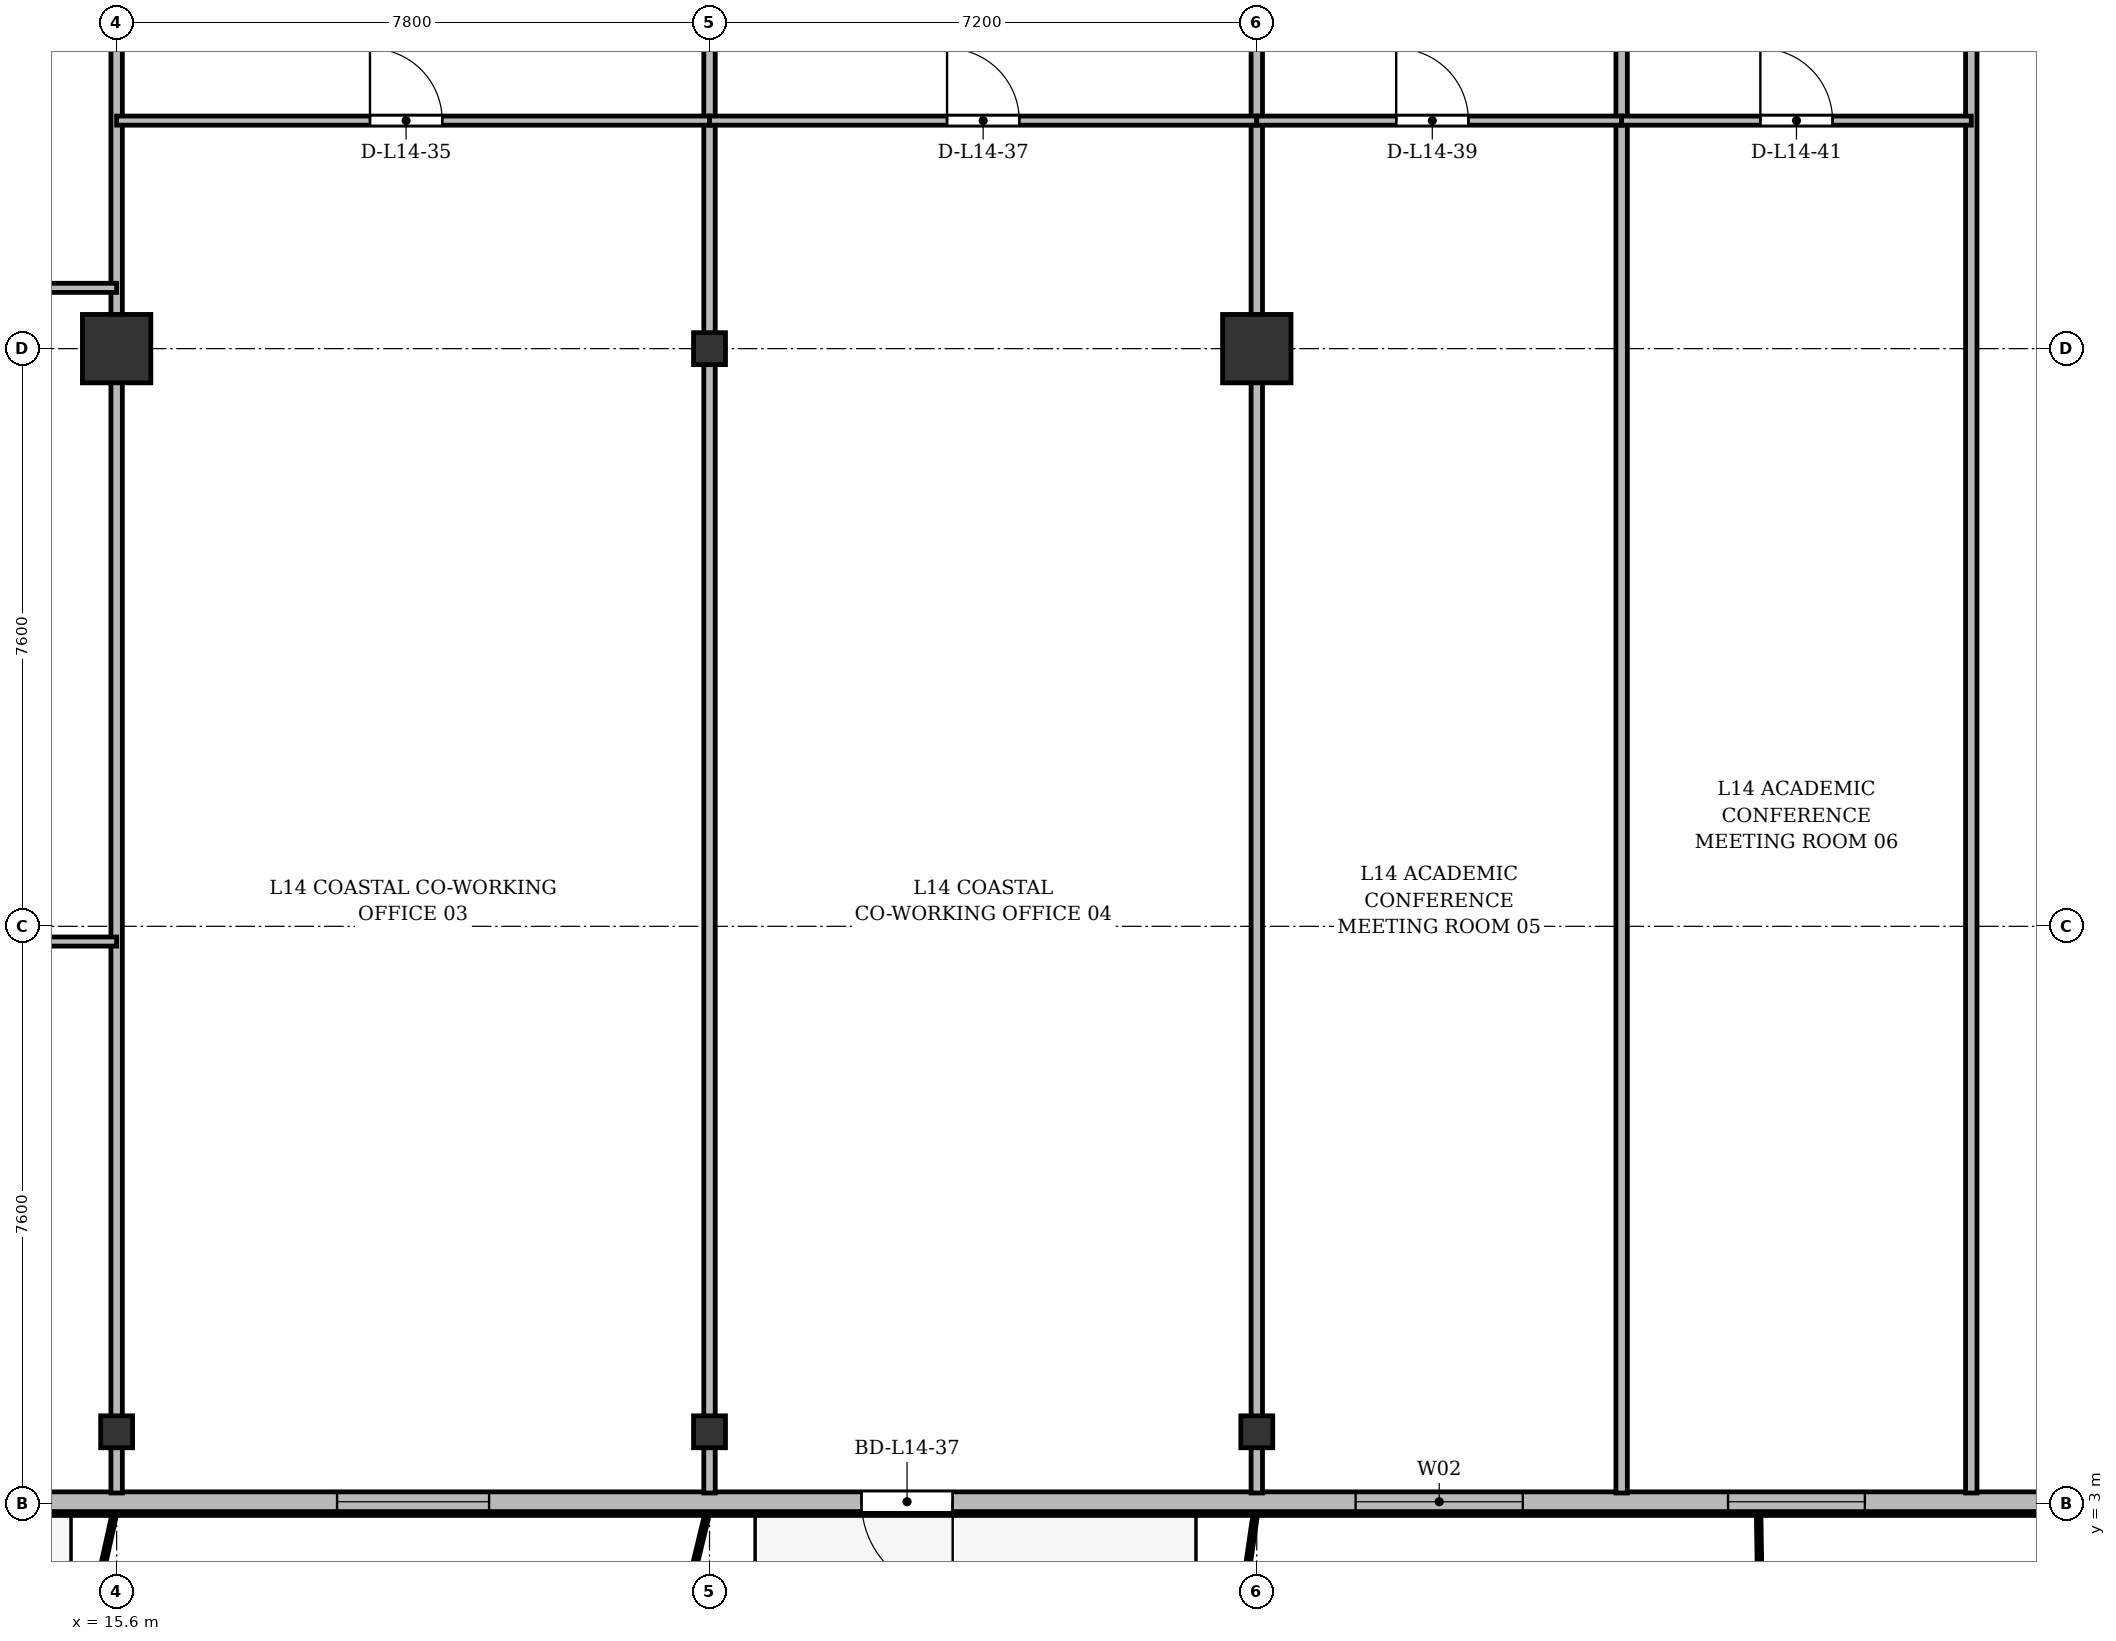
"""IFC4 building model, lengths in metres.
Left out: names, types, materials, properties, quantities, classifications, styles, units other than length and angle.
Written with IfcOpenShell. Run it as: python <this file> out.ifc"""

import sys

from ifc_helpers import new_model, si_unit, direction, frame, frame_2d, origin, origin_2d, place, context, subcontext, project, spatial, rectangle, i_section, extrude, source, transform, mapped, element, fill, save


model = new_model("IFC4")
c1 = context("Model", 3, precision=1e-05, world=origin(), true_north=direction((0.0, 1.0)))
c2 = subcontext(c1, "Body", "Model", "MODEL_VIEW")
j1 = project(units=[si_unit("LENGTHUNIT", "METRE"), si_unit("PLANEANGLEUNIT", "RADIAN")], contexts=[c1])
p1 = place(None, origin())
s1 = spatial("IfcSite", under=j1, at=p1, CompositionType="ELEMENT")
p2 = place(p1, origin())
s2 = spatial("IfcBuilding", under=s1, at=p2, CompositionType="ELEMENT")
p3 = place(p2, frame((0.0, 0.0, 55.9)))
s3 = spatial("IfcBuildingStorey", under=s2, at=p3, CompositionType="ELEMENT", Elevation=55.9)
m1 = source(origin(), c2, "Body", "SweptSolid", [
    extrude(i_section(OverallWidth=0.42, OverallDepth=0.42, WebThickness=0.026, FlangeThickness=0.04, at=origin_2d()), origin(), (0.0, 0.0, 1.0), 3.6),
])
p4 = place(p3, frame((15.6, 3.95, 0.0), z_axis=(0.0, 0.0, 1.0), x_axis=(1.0, 0.0, 0.0)))
e1 = element("IfcColumn", 1, at=p4, inside=s3, PredefinedType="COLUMN", context=c2, shape_type="MappedRepresentation", body=[
    mapped(m1, transform((0.0, 0.0, 0.0), x_axis=(1.0, 0.0, 0.0), y_axis=(0.0, 1.0, 0.0), z_axis=(0.0, 0.0, 1.0), scale=1.0)),
])
m2 = source(origin(), c2, "Body", "SweptSolid", [
    extrude(rectangle(XDim=0.9, YDim=0.9, at=origin_2d()), origin(), (0.0, 0.0, 1.0), 3.6),
])
p5 = place(p3, frame((15.6, 18.2, 0.0), z_axis=(0.0, 0.0, 1.0), x_axis=(1.0, 0.0, 0.0)))
e2 = element("IfcColumn", 2, at=p5, inside=s3, PredefinedType="COLUMN", context=c2, shape_type="MappedRepresentation", body=[
    mapped(m2, transform((0.0, 0.0, 0.0), x_axis=(1.0, 0.0, 0.0), y_axis=(0.0, 1.0, 0.0), z_axis=(0.0, 0.0, 1.0), scale=1.0)),
])
for number, where, z_axis, x_axis in (
    (3, (23.4, 3.95, 0.0), (0.0, 0.0, 1.0), (1.0, 0.0, 0.0)),
    (4, (23.4, 18.2, 0.0), (0.0, 0.0, 1.0), (1.0, 0.0, 0.0)),
    (5, (30.6, 3.95, 0.0), (0.0, 0.0, 1.0), (1.0, 0.0, 0.0)),
):
    element("IfcColumn", number, at=place(p3, frame(where, z_axis=z_axis, x_axis=x_axis)), inside=s3, PredefinedType="COLUMN", context=c2, shape_type="MappedRepresentation", body=[
        mapped(m1, transform((0.0, 0.0, 0.0), x_axis=(1.0, 0.0, 0.0), y_axis=(0.0, 1.0, 0.0), z_axis=(0.0, 0.0, 1.0), scale=1.0)),
    ])
p6 = place(p3, frame((30.6, 18.2, 0.0), z_axis=(0.0, 0.0, 1.0), x_axis=(1.0, 0.0, 0.0)))
e6 = element("IfcColumn", 6, at=p6, inside=s3, PredefinedType="COLUMN", context=c2, shape_type="MappedRepresentation", body=[
    mapped(m2, transform((0.0, 0.0, 0.0), x_axis=(1.0, 0.0, 0.0), y_axis=(0.0, 1.0, 0.0), z_axis=(0.0, 0.0, 1.0), scale=1.0)),
])
p7 = place(p3, frame((66.9, 3.03, 0.0), z_axis=(0.0, 0.0, 1.0), x_axis=(-1.0, 0.0, 0.0)))
e7 = element("IfcWall", 7, at=p7, inside=s3, PredefinedType="SOLIDWALL", context=c2, shape_type="SweptSolid", body=[
    extrude(rectangle(XDim=59.4, YDim=0.26, at=frame_2d((29.7, 0.0))), origin(), (0.0, 0.0, 1.0), 3.34),
])
p8 = place(p7, frame((3.8, 0.0, 0.9)))
e8 = element("IfcOpeningElement", 8, at=p8, cuts=e7, PredefinedType="OPENING", context=c2, shape_type="SweptSolid", body=[
    extrude(rectangle(XDim=1.8, YDim=1.8, at=frame_2d((0.9, 0.9))), frame((0.0, 0.14, 0.0), z_axis=(0.0, -1.0, 0.0), x_axis=(1.0, 0.0, 0.0)), (0.0, 0.0, 1.0), 0.28),
])
p9 = place(p7, frame((9.18, 0.0, 0.0)))
e9 = element("IfcOpeningElement", 9, at=p9, cuts=e7, PredefinedType="OPENING", context=c2, shape_type="SweptSolid", body=[
    extrude(rectangle(XDim=1.2, YDim=2.2, at=frame_2d((0.6, 1.1))), frame((0.0, 0.14, 0.0), z_axis=(0.0, -1.0, 0.0), x_axis=(1.0, 0.0, 0.0)), (0.0, 0.0, 1.0), 0.28),
])
p10 = place(p7, frame((13.2, 0.0, 0.9)))
e10 = element("IfcOpeningElement", 10, at=p10, cuts=e7, PredefinedType="OPENING", context=c2, shape_type="SweptSolid", body=[
    extrude(rectangle(XDim=1.5, YDim=1.75, at=frame_2d((0.75, 0.875))), frame((0.0, 0.14, 0.0), z_axis=(0.0, -1.0, 0.0), x_axis=(1.0, 0.0, 0.0)), (0.0, 0.0, 1.0), 0.28),
])
p11 = place(p7, frame((18.5, 0.0, 0.9)))
e11 = element("IfcOpeningElement", 11, at=p11, cuts=e7, PredefinedType="OPENING", context=c2, shape_type="SweptSolid", body=[
    extrude(rectangle(XDim=2.0, YDim=1.95, at=frame_2d((1.0, 0.975))), frame((0.0, 0.14, 0.0), z_axis=(0.0, -1.0, 0.0), x_axis=(1.0, 0.0, 0.0)), (0.0, 0.0, 1.0), 0.28),
])
p12 = place(p7, frame((24.175, 0.0, 0.9)))
e12 = element("IfcOpeningElement", 12, at=p12, cuts=e7, PredefinedType="OPENING", context=c2, shape_type="SweptSolid", body=[
    extrude(rectangle(XDim=1.65, YDim=1.85, at=frame_2d((0.825, 0.925))), frame((0.0, 0.14, 0.0), z_axis=(0.0, -1.0, 0.0), x_axis=(1.0, 0.0, 0.0)), (0.0, 0.0, 1.0), 0.28),
])
p13 = place(p7, frame((28.3, 0.0, 0.9)))
e13 = element("IfcOpeningElement", 13, at=p13, cuts=e7, PredefinedType="OPENING", context=c2, shape_type="SweptSolid", body=[
    extrude(rectangle(XDim=1.8, YDim=1.8, at=frame_2d((0.9, 0.9))), frame((0.0, 0.14, 0.0), z_axis=(0.0, -1.0, 0.0), x_axis=(1.0, 0.0, 0.0)), (0.0, 0.0, 1.0), 0.28),
])
p14 = place(p7, frame((32.8, 0.0, 0.9)))
e14 = element("IfcOpeningElement", 14, at=p14, cuts=e7, PredefinedType="OPENING", context=c2, shape_type="SweptSolid", body=[
    extrude(rectangle(XDim=2.2, YDim=1.8, at=frame_2d((1.1, 0.9))), frame((0.0, 0.14, 0.0), z_axis=(0.0, -1.0, 0.0), x_axis=(1.0, 0.0, 0.0)), (0.0, 0.0, 1.0), 0.28),
])
p15 = place(p7, frame((40.301, 0.0, 0.0)))
e15 = element("IfcOpeningElement", 15, at=p15, cuts=e7, PredefinedType="OPENING", context=c2, shape_type="SweptSolid", body=[
    extrude(rectangle(XDim=1.2, YDim=2.2, at=frame_2d((0.6, 1.1))), frame((0.0, 0.14, 0.0), z_axis=(0.0, -1.0, 0.0), x_axis=(1.0, 0.0, 0.0)), (0.0, 0.0, 1.0), 0.28),
])
p16 = place(p7, frame((46.4, 0.0, 0.9)))
e16 = element("IfcOpeningElement", 16, at=p16, cuts=e7, PredefinedType="OPENING", context=c2, shape_type="SweptSolid", body=[
    extrude(rectangle(XDim=2.0, YDim=1.95, at=frame_2d((1.0, 0.975))), frame((0.0, 0.14, 0.0), z_axis=(0.0, -1.0, 0.0), x_axis=(1.0, 0.0, 0.0)), (0.0, 0.0, 1.0), 0.28),
])
p17 = place(p7, frame((53.136, 0.0, 0.0)))
e17 = element("IfcOpeningElement", 17, at=p17, cuts=e7, PredefinedType="OPENING", context=c2, shape_type="SweptSolid", body=[
    extrude(rectangle(XDim=1.2, YDim=2.2, at=frame_2d((0.6, 1.1))), frame((0.0, 0.14, 0.0), z_axis=(0.0, -1.0, 0.0), x_axis=(1.0, 0.0, 0.0)), (0.0, 0.0, 1.0), 0.28),
])
p18 = place(p7, frame((55.5, 0.0, 0.9)))
e18 = element("IfcOpeningElement", 18, at=p18, cuts=e7, PredefinedType="OPENING", context=c2, shape_type="SweptSolid", body=[
    extrude(rectangle(XDim=1.8, YDim=1.8, at=frame_2d((0.9, 0.9))), frame((0.0, 0.14, 0.0), z_axis=(0.0, -1.0, 0.0), x_axis=(1.0, 0.0, 0.0)), (0.0, 0.0, 1.0), 0.28),
])
for number, where, z_axis, x_axis in (
    (19, (15.6, 3.145, 0.0), (0.0, 0.0, 1.0), (0.0, 1.0, 0.0)),
    (20, (23.4, 3.145, 0.0), (0.0, 0.0, 1.0), (0.0, 1.0, 0.0)),
    (21, (30.6, 3.145, 0.0), (0.0, 0.0, 1.0), (0.0, 1.0, 0.0)),
):
    element("IfcWall", number, at=place(p3, frame(where, z_axis=z_axis, x_axis=x_axis)), inside=s3, PredefinedType="PARTITIONING", context=c2, shape_type="SweptSolid", body=[
        extrude(rectangle(XDim=24.455, YDim=0.15, at=frame_2d((12.228, 0.0))), origin(), (0.0, 0.0, 1.0), 2.752),
    ])
for number, where, z_axis, x_axis in (
    (22, (35.4, 3.145, 0.0), (0.0, 0.0, 1.0), (0.0, 1.0, 0.0)),
    (23, (40.0, 3.145, 0.0), (0.0, 0.0, 1.0), (0.0, 1.0, 0.0)),
):
    element("IfcWall", number, at=place(p3, frame(where, z_axis=z_axis, x_axis=x_axis)), inside=s3, PredefinedType="PARTITIONING", context=c2, shape_type="SweptSolid", body=[
        extrude(rectangle(XDim=24.455, YDim=0.15, at=frame_2d((12.228, 0.0))), origin(), (0.0, 0.0, 1.0), 2.69),
    ])
p19 = place(p3, frame((8.8, 19.0, 0.0), z_axis=(0.0, 0.0, 1.0), x_axis=(1.0, 0.0, 0.0)))
e24 = element("IfcWall", 24, at=p19, inside=s3, PredefinedType="PARTITIONING", context=c2, shape_type="SweptSolid", body=[
    extrude(rectangle(XDim=6.8, YDim=0.12, at=frame_2d((3.4, 0.0))), origin(), (0.0, 0.0, 1.0), 2.752),
])
p20 = place(p19, frame((2.925, 0.0, 0.0)))
e25 = element("IfcOpeningElement", 25, at=p20, cuts=e24, PredefinedType="OPENING", context=c2, shape_type="SweptSolid", body=[
    extrude(rectangle(XDim=0.95, YDim=2.15, at=frame_2d((0.475, 1.075))), frame((0.0, 0.07, 0.0), z_axis=(0.0, -1.0, 0.0), x_axis=(1.0, 0.0, 0.0)), (0.0, 0.0, 1.0), 0.14),
])
p21 = place(p3, frame((12.2, 10.4, 0.0), z_axis=(0.0, 0.0, 1.0), x_axis=(1.0, 0.0, 0.0)))
e26 = element("IfcWall", 26, at=p21, inside=s3, PredefinedType="PARTITIONING", context=c2, shape_type="SweptSolid", body=[
    extrude(rectangle(XDim=3.4, YDim=0.12, at=frame_2d((1.7, 0.0))), origin(), (0.0, 0.0, 1.0), 2.752),
])
p22 = place(p21, frame((1.131, 0.0, 0.0)))
e27 = element("IfcOpeningElement", 27, at=p22, cuts=e26, PredefinedType="OPENING", context=c2, shape_type="SweptSolid", body=[
    extrude(rectangle(XDim=0.95, YDim=2.15, at=frame_2d((0.475, 1.075))), frame((0.0, 0.07, 0.0), z_axis=(0.0, -1.0, 0.0), x_axis=(1.0, 0.0, 0.0)), (0.0, 0.0, 1.0), 0.14),
])
p23 = place(p3, frame((15.6, 21.2, 0.0), z_axis=(0.0, 0.0, 1.0), x_axis=(1.0, 0.0, 0.0)))
e28 = element("IfcWall", 28, at=p23, inside=s3, PredefinedType="PARTITIONING", context=c2, shape_type="SweptSolid", body=[
    extrude(rectangle(XDim=7.8, YDim=0.12, at=frame_2d((3.9, 0.0))), origin(), (0.0, 0.0, 1.0), 2.752),
])
p24 = place(p23, frame((3.333, 0.0, 0.0)))
e29 = element("IfcOpeningElement", 29, at=p24, cuts=e28, PredefinedType="OPENING", context=c2, shape_type="SweptSolid", body=[
    extrude(rectangle(XDim=0.95, YDim=2.15, at=frame_2d((0.475, 1.075))), frame((0.0, 0.07, 0.0), z_axis=(0.0, -1.0, 0.0), x_axis=(1.0, 0.0, 0.0)), (0.0, 0.0, 1.0), 0.14),
])
p25 = place(p3, frame((23.4, 21.2, 0.0), z_axis=(0.0, 0.0, 1.0), x_axis=(1.0, 0.0, 0.0)))
e30 = element("IfcWall", 30, at=p25, inside=s3, PredefinedType="PARTITIONING", context=c2, shape_type="SweptSolid", body=[
    extrude(rectangle(XDim=7.2, YDim=0.12, at=frame_2d((3.6, 0.0))), origin(), (0.0, 0.0, 1.0), 2.752),
])
p26 = place(p25, frame((3.125, 0.0, 0.0)))
e31 = element("IfcOpeningElement", 31, at=p26, cuts=e30, PredefinedType="OPENING", context=c2, shape_type="SweptSolid", body=[
    extrude(rectangle(XDim=0.95, YDim=2.15, at=frame_2d((0.475, 1.075))), frame((0.0, 0.07, 0.0), z_axis=(0.0, -1.0, 0.0), x_axis=(1.0, 0.0, 0.0)), (0.0, 0.0, 1.0), 0.14),
])
p27 = place(p3, frame((30.6, 21.2, 0.0), z_axis=(0.0, 0.0, 1.0), x_axis=(1.0, 0.0, 0.0)))
e32 = element("IfcWall", 32, at=p27, inside=s3, PredefinedType="PARTITIONING", context=c2, shape_type="SweptSolid", body=[
    extrude(rectangle(XDim=4.8, YDim=0.12, at=frame_2d((2.4, 0.0))), origin(), (0.0, 0.0, 1.0), 2.752),
])
p28 = place(p27, frame((1.834, 0.0, 0.0)))
e33 = element("IfcOpeningElement", 33, at=p28, cuts=e32, PredefinedType="OPENING", context=c2, shape_type="SweptSolid", body=[
    extrude(rectangle(XDim=0.95, YDim=2.15, at=frame_2d((0.475, 1.075))), frame((0.0, 0.07, 0.0), z_axis=(0.0, -1.0, 0.0), x_axis=(1.0, 0.0, 0.0)), (0.0, 0.0, 1.0), 0.14),
])
p29 = place(p3, frame((35.4, 21.2, 0.0), z_axis=(0.0, 0.0, 1.0), x_axis=(1.0, 0.0, 0.0)))
e34 = element("IfcWall", 34, at=p29, inside=s3, PredefinedType="PARTITIONING", context=c2, shape_type="SweptSolid", body=[
    extrude(rectangle(XDim=4.6, YDim=0.12, at=frame_2d((2.3, 0.0))), origin(), (0.0, 0.0, 1.0), 3.34),
])
p30 = place(p29, frame((1.825, 0.0, 0.0)))
e35 = element("IfcOpeningElement", 35, at=p30, cuts=e34, PredefinedType="OPENING", context=c2, shape_type="SweptSolid", body=[
    extrude(rectangle(XDim=0.95, YDim=2.15, at=frame_2d((0.475, 1.075))), frame((0.0, 0.07, 0.0), z_axis=(0.0, -1.0, 0.0), x_axis=(1.0, 0.0, 0.0)), (0.0, 0.0, 1.0), 0.14),
])
m3 = source(origin(), c2, "Body", "SweptSolid", [
    extrude(rectangle(XDim=1.8, YDim=1.8, at=frame_2d((0.9, 0.9))), frame((0.0, 0.03, 0.0), z_axis=(0.0, -1.0, 0.0), x_axis=(1.0, 0.0, 0.0)), (0.0, 0.0, 1.0), 0.06),
])
p31 = place(p13, origin())
e36 = element("IfcWindow", 36, at=p31, inside=s3, PartitioningType="SINGLE_PANEL", PredefinedType="WINDOW", context=c2, shape_type="MappedRepresentation", body=[
    mapped(m3, transform((0.0, 0.0, 0.0), x_axis=(1.0, 0.0, 0.0), y_axis=(0.0, 1.0, 0.0), z_axis=(0.0, 0.0, 1.0), scale=1.0)),
])
fill(e13, e36)
m4 = source(origin(), c2, "Body", "SweptSolid", [
    extrude(rectangle(XDim=2.2, YDim=1.8, at=frame_2d((1.1, 0.9))), frame((0.0, 0.03, 0.0), z_axis=(0.0, -1.0, 0.0), x_axis=(1.0, 0.0, 0.0)), (0.0, 0.0, 1.0), 0.06),
])
p32 = place(p14, origin())
e37 = element("IfcWindow", 37, at=p32, inside=s3, PartitioningType="SINGLE_PANEL", PredefinedType="WINDOW", context=c2, shape_type="MappedRepresentation", body=[
    mapped(m4, transform((0.0, 0.0, 0.0), x_axis=(1.0, 0.0, 0.0), y_axis=(0.0, 1.0, 0.0), z_axis=(0.0, 0.0, 1.0), scale=1.0)),
])
fill(e14, e37)
m5 = source(origin(), c2, "Body", "SweptSolid", [
    extrude(rectangle(XDim=1.2, YDim=2.2, at=frame_2d((0.6, 1.1))), frame((0.0, 0.025, 0.0), z_axis=(0.0, -1.0, 0.0), x_axis=(1.0, 0.0, 0.0)), (0.0, 0.0, 1.0), 0.05),
])
p33 = place(p15, origin())
e38 = element("IfcDoor", 38, at=p33, inside=s3, OperationType="SINGLE_SWING_LEFT", PredefinedType="DOOR", context=c2, shape_type="MappedRepresentation", body=[
    mapped(m5, transform((0.0, 0.0, 0.0), x_axis=(1.0, 0.0, 0.0), y_axis=(0.0, 1.0, 0.0), z_axis=(0.0, 0.0, 1.0), scale=1.0)),
])
fill(e15, e38)
m6 = source(origin(), c2, "Body", "SweptSolid", [
    extrude(rectangle(XDim=2.0, YDim=1.95, at=frame_2d((1.0, 0.975))), frame((0.0, 0.03, 0.0), z_axis=(0.0, -1.0, 0.0), x_axis=(1.0, 0.0, 0.0)), (0.0, 0.0, 1.0), 0.06),
])
p34 = place(p16, origin())
e39 = element("IfcWindow", 39, at=p34, inside=s3, PartitioningType="SINGLE_PANEL", PredefinedType="WINDOW", context=c2, shape_type="MappedRepresentation", body=[
    mapped(m6, transform((0.0, 0.0, 0.0), x_axis=(1.0, 0.0, 0.0), y_axis=(0.0, 1.0, 0.0), z_axis=(0.0, 0.0, 1.0), scale=1.0)),
])
fill(e16, e39)
m7 = source(origin(), c2, "Body", "SweptSolid", [
    extrude(rectangle(XDim=0.95, YDim=2.15, at=frame_2d((0.475, 1.075))), frame((0.0, 0.025, 0.0), z_axis=(0.0, -1.0, 0.0), x_axis=(1.0, 0.0, 0.0)), (0.0, 0.0, 1.0), 0.05),
])
p35 = place(p24, origin())
e40 = element("IfcDoor", 40, at=p35, inside=s3, OperationType="SINGLE_SWING_LEFT", PredefinedType="DOOR", context=c2, shape_type="MappedRepresentation", body=[
    mapped(m7, transform((0.0, 0.0, 0.0), x_axis=(1.0, 0.0, 0.0), y_axis=(0.0, 1.0, 0.0), z_axis=(0.0, 0.0, 1.0), scale=1.0)),
])
fill(e29, e40)
p36 = place(p26, origin())
e41 = element("IfcDoor", 41, at=p36, inside=s3, OperationType="SINGLE_SWING_LEFT", PredefinedType="DOOR", context=c2, shape_type="MappedRepresentation", body=[
    mapped(m7, transform((0.0, 0.0, 0.0), x_axis=(1.0, 0.0, 0.0), y_axis=(0.0, 1.0, 0.0), z_axis=(0.0, 0.0, 1.0), scale=1.0)),
])
fill(e31, e41)
p37 = place(p28, origin())
e42 = element("IfcDoor", 42, at=p37, inside=s3, OperationType="SINGLE_SWING_LEFT", PredefinedType="DOOR", context=c2, shape_type="MappedRepresentation", body=[
    mapped(m7, transform((0.0, 0.0, 0.0), x_axis=(1.0, 0.0, 0.0), y_axis=(0.0, 1.0, 0.0), z_axis=(0.0, 0.0, 1.0), scale=1.0)),
])
fill(e33, e42)
p38 = place(p30, origin())
e43 = element("IfcDoor", 43, at=p38, inside=s3, OperationType="SINGLE_SWING_LEFT", PredefinedType="DOOR", context=c2, shape_type="MappedRepresentation", body=[
    mapped(m7, transform((0.0, 0.0, 0.0), x_axis=(1.0, 0.0, 0.0), y_axis=(0.0, 1.0, 0.0), z_axis=(0.0, 0.0, 1.0), scale=1.0)),
])
fill(e35, e43)
save(model, sys.argv[1])
